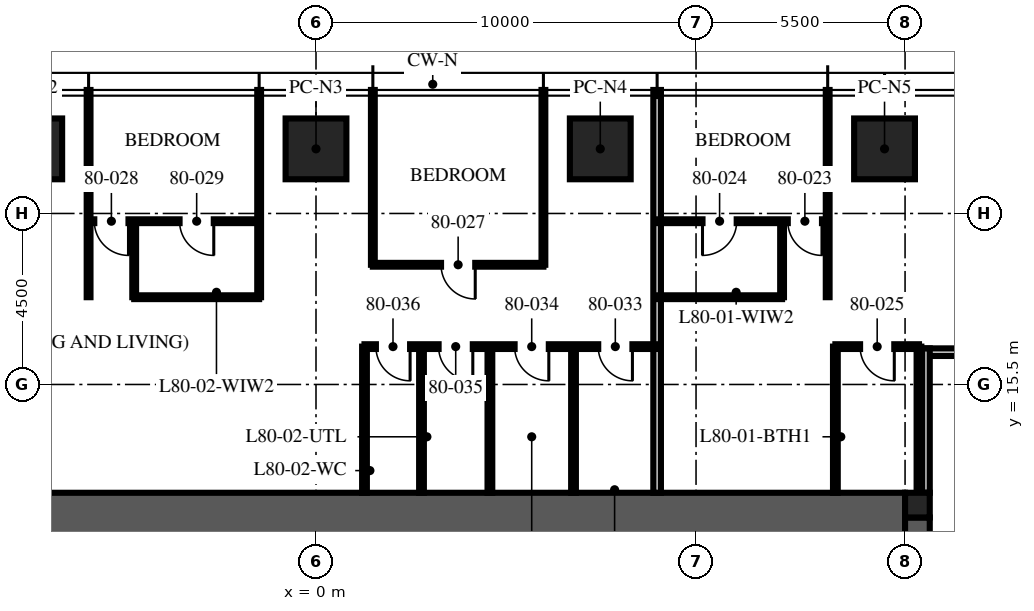
"""IFC4 building model, lengths in metres.
Left out: names, types, materials, properties, quantities, classifications, styles, units other than length and angle.
Written with IfcOpenShell. Run it as: python <this file> out.ifc"""

import sys

from ifc_helpers import new_model, si_unit, direction, frame, frame_2d, origin, origin_2d, place, context, subcontext, project, spatial, rectangle, extrude, element, fill, save


model = new_model("IFC4")
c1 = context("Model", 3, precision=1e-05, world=origin(), true_north=direction((0.0, 1.0)))
c2 = subcontext(c1, "Body", "Model", "MODEL_VIEW")
j1 = project(units=[si_unit("LENGTHUNIT", "METRE"), si_unit("PLANEANGLEUNIT", "RADIAN")], contexts=[c1])
p1 = place(None, origin())
s1 = spatial("IfcSite", under=j1, at=p1, CompositionType="ELEMENT")
p2 = place(p1, origin())
s2 = spatial("IfcBuilding", under=s1, at=p2, CompositionType="ELEMENT")
p3 = place(p2, frame((0.0, 0.0, 319.5)))
s3 = spatial("IfcBuildingStorey", under=s2, at=p3, CompositionType="ELEMENT", Elevation=319.5)
p4 = place(p3, frame((15.5, -12.0, -0.25), z_axis=(0.0, 0.0, 1.0), x_axis=(0.0, 1.0, 0.0)))
e1 = element("IfcWall", 1, at=p4, inside=s3, PredefinedType="SHEAR", context=c2, shape_type="SweptSolid", body=[
    extrude(rectangle(XDim=24.0, YDim=1.3, at=frame_2d((12.0, 0.0))), origin(), (0.0, 0.0, 1.0), 3.75),
])
p5 = place(p4, frame((3.125, 0.0, 0.25)))
e2 = element("IfcOpeningElement", 2, at=p5, cuts=e1, PredefinedType="OPENING", context=c2, shape_type="SweptSolid", body=[
    extrude(rectangle(XDim=1.2, YDim=2.1, at=frame_2d((0.6, 1.05))), frame((0.0, 0.66, 0.0), z_axis=(0.0, -1.0, 0.0), x_axis=(1.0, 0.0, 0.0)), (0.0, 0.0, 1.0), 1.32),
])
p6 = place(p4, frame((19.375, 0.0, 0.25)))
e3 = element("IfcOpeningElement", 3, at=p6, cuts=e1, PredefinedType="OPENING", context=c2, shape_type="SweptSolid", body=[
    extrude(rectangle(XDim=1.8, YDim=2.1, at=frame_2d((0.9, 1.05))), frame((0.0, 0.66, 0.0), z_axis=(0.0, -1.0, 0.0), x_axis=(1.0, 0.0, 0.0)), (0.0, 0.0, 1.0), 1.32),
])
p7 = place(p3, frame((-15.5, 12.0, -0.25), z_axis=(0.0, 0.0, 1.0), x_axis=(1.0, 0.0, 0.0)))
e4 = element("IfcWall", 4, at=p7, inside=s3, PredefinedType="SHEAR", context=c2, shape_type="SweptSolid", body=[
    extrude(rectangle(XDim=31.0, YDim=1.3, at=frame_2d((15.5, 0.0))), origin(), (0.0, 0.0, 1.0), 3.75),
])
p8 = place(p3, frame((15.825, 12.325, -0.25), z_axis=(0.0, 0.0, 1.0), x_axis=(1.0, 0.0, 0.0)))
e5 = element("IfcColumn", 5, at=p8, inside=s3, PredefinedType="COLUMN", context=c2, shape_type="SweptSolid", body=[
    extrude(rectangle(XDim=0.65, YDim=0.65, at=origin_2d()), origin(), (0.0, 0.0, 1.0), 3.75),
])
for number, where, z_axis, x_axis in (
    (6, (-7.48, 21.7, 0.0), (0.0, 0.0, 1.0), (1.0, 0.0, 0.0)),
    (7, (0.0, 21.7, 0.0), (0.0, 0.0, 1.0), (1.0, 0.0, 0.0)),
    (8, (7.48, 21.7, 0.0), (0.0, 0.0, 1.0), (1.0, 0.0, 0.0)),
    (9, (14.96, 21.7, 0.0), (0.0, 0.0, 1.0), (1.0, 0.0, 0.0)),
):
    element("IfcColumn", number, at=place(p3, frame(where, z_axis=z_axis, x_axis=x_axis)), inside=s3, PredefinedType="COLUMN", context=c2, shape_type="SweptSolid", body=[
        extrude(rectangle(XDim=1.6, YDim=1.6, at=origin_2d()), origin(), (0.0, 0.0, 1.0), 3.75),
    ])
p9 = place(p3, frame((19.15, 16.35, 0.0), z_axis=(0.0, 0.0, 1.0), x_axis=(-1.0, 0.0, 0.0)))
e10 = element("IfcWall", 10, at=p9, inside=s3, PredefinedType="PARTITIONING", context=c2, shape_type="SweptSolid", body=[
    extrude(rectangle(XDim=3.2, YDim=0.2, at=frame_2d((1.6, 0.0))), origin(), (0.0, 0.0, 1.0), 2.6),
])
p10 = place(p3, frame((16.05, 16.45, 0.0), z_axis=(0.0, 0.0, 1.0), x_axis=(0.0, -1.0, 0.0)))
e11 = element("IfcWall", 11, at=p10, inside=s3, PredefinedType="PARTITIONING", context=c2, shape_type="SweptSolid", body=[
    extrude(rectangle(XDim=3.8, YDim=0.2, at=frame_2d((1.9, 0.0))), origin(), (0.0, 0.0, 1.0), 2.6),
])
p11 = place(p3, frame((13.464, 17.796, 0.0), z_axis=(0.0, 0.0, 1.0), x_axis=(0.0, 1.0, 0.0)))
e12 = element("IfcWall", 12, at=p11, inside=s3, PredefinedType="PARTITIONING", context=c2, shape_type="SweptSolid", body=[
    extrude(rectangle(XDim=5.454, YDim=0.1, at=frame_2d((2.727, 0.0))), origin(), (0.0, 0.0, 1.0), 3.01),
])
p12 = place(p3, frame((8.976, 12.65, 0.0), z_axis=(0.0, 0.0, 1.0), x_axis=(0.0, 1.0, 0.0)))
e13 = element("IfcWall", 13, at=p12, inside=s3, PredefinedType="PARTITIONING", context=c2, shape_type="SweptSolid", body=[
    extrude(rectangle(XDim=10.6, YDim=0.2, at=frame_2d((5.3, 0.0))), origin(), (0.0, 0.0, 1.0), 3.01),
])
for number, where, z_axis, x_axis in (
    (14, (5.984, 18.65, 0.0), (0.0, 0.0, 1.0), (0.0, 1.0, 0.0)),
    (15, (1.496, 18.65, 0.0), (0.0, 0.0, 1.0), (0.0, 1.0, 0.0)),
):
    element("IfcWall", number, at=place(p3, frame(where, z_axis=z_axis, x_axis=x_axis)), inside=s3, PredefinedType="PARTITIONING", context=c2, shape_type="SweptSolid", body=[
        extrude(rectangle(XDim=4.6, YDim=0.1, at=frame_2d((2.3, 0.0))), origin(), (0.0, 0.0, 1.0), 3.01),
    ])
for number, where, z_axis, x_axis in (
    (16, (-1.496, 17.796, 0.0), (0.0, 0.0, 1.0), (0.0, 1.0, 0.0)),
    (17, (-5.984, 17.796, 0.0), (0.0, 0.0, 1.0), (0.0, 1.0, 0.0)),
):
    element("IfcWall", number, at=place(p3, frame(where, z_axis=z_axis, x_axis=x_axis)), inside=s3, PredefinedType="PARTITIONING", context=c2, shape_type="SweptSolid", body=[
        extrude(rectangle(XDim=5.454, YDim=0.1, at=frame_2d((2.727, 0.0))), origin(), (0.0, 0.0, 1.0), 3.01),
    ])
p13 = place(p3, frame((13.464, 19.796, 0.0), z_axis=(0.0, 0.0, 1.0), x_axis=(-1.0, 0.0, 0.0)))
e18 = element("IfcWall", 18, at=p13, inside=s3, PredefinedType="PARTITIONING", context=c2, shape_type="SweptSolid", body=[
    extrude(rectangle(XDim=4.488, YDim=0.1, at=frame_2d((2.244, 0.0))), origin(), (0.0, 0.0, 1.0), 2.91),
])
p14 = place(p13, frame((0.15, 0.0, 0.0)))
e19 = element("IfcOpeningElement", 19, at=p14, cuts=e18, PredefinedType="OPENING", context=c2, shape_type="SweptSolid", body=[
    extrude(rectangle(XDim=0.9, YDim=2.1, at=frame_2d((0.45, 1.05))), frame((0.0, 0.06, 0.0), z_axis=(0.0, -1.0, 0.0), x_axis=(1.0, 0.0, 0.0)), (0.0, 0.0, 1.0), 0.12),
])
p15 = place(p13, frame((2.394, 0.0, 0.0)))
e20 = element("IfcOpeningElement", 20, at=p15, cuts=e18, PredefinedType="OPENING", context=c2, shape_type="SweptSolid", body=[
    extrude(rectangle(XDim=0.9, YDim=2.1, at=frame_2d((0.45, 1.05))), frame((0.0, 0.06, 0.0), z_axis=(0.0, -1.0, 0.0), x_axis=(1.0, 0.0, 0.0)), (0.0, 0.0, 1.0), 0.12),
])
p16 = place(p3, frame((12.264, 17.796, 0.0), z_axis=(0.0, 0.0, 1.0), x_axis=(0.0, 1.0, 0.0)))
e21 = element("IfcWall", 21, at=p16, inside=s3, PredefinedType="PARTITIONING", context=c2, shape_type="SweptSolid", body=[
    extrude(rectangle(XDim=2.0, YDim=0.1, at=frame_2d((1.0, 0.0))), origin(), (0.0, 0.0, 1.0), 3.5),
])
p17 = place(p3, frame((12.264, 17.796, 0.0), z_axis=(0.0, 0.0, 1.0), x_axis=(-1.0, 0.0, 0.0)))
e22 = element("IfcWall", 22, at=p17, inside=s3, PredefinedType="PARTITIONING", context=c2, shape_type="SweptSolid", body=[
    extrude(rectangle(XDim=3.288, YDim=0.1, at=frame_2d((1.644, 0.0))), origin(), (0.0, 0.0, 1.0), 2.91),
])
p18 = place(p3, frame((15.866, 16.496, 0.0), z_axis=(0.0, 0.0, 1.0), x_axis=(-1.0, 0.0, 0.0)))
e23 = element("IfcWall", 23, at=p18, inside=s3, PredefinedType="PARTITIONING", context=c2, shape_type="SweptSolid", body=[
    extrude(rectangle(XDim=2.2, YDim=0.125, at=frame_2d((1.1, 0.0))), origin(), (0.0, 0.0, 1.0), 2.9),
])
p19 = place(p18, frame((0.65, 0.0, 0.0)))
e24 = element("IfcOpeningElement", 24, at=p19, cuts=e23, PredefinedType="OPENING", context=c2, shape_type="SweptSolid", body=[
    extrude(rectangle(XDim=0.9, YDim=2.1, at=frame_2d((0.45, 1.05))), frame((0.0, 0.073, 0.0), z_axis=(0.0, -1.0, 0.0), x_axis=(1.0, 0.0, 0.0)), (0.0, 0.0, 1.0), 0.145),
])
p20 = place(p3, frame((15.866, 12.65, 0.0), z_axis=(0.0, 0.0, 1.0), x_axis=(0.0, 1.0, 0.0)))
e25 = element("IfcWall", 25, at=p20, inside=s3, PredefinedType="PARTITIONING", context=c2, shape_type="SweptSolid", body=[
    extrude(rectangle(XDim=3.846, YDim=0.125, at=frame_2d((1.923, 0.0))), origin(), (0.0, 0.0, 1.0), 2.6),
])
p21 = place(p3, frame((13.667, 12.65, 0.0), z_axis=(0.0, 0.0, 1.0), x_axis=(0.0, 1.0, 0.0)))
e26 = element("IfcWall", 26, at=p21, inside=s3, PredefinedType="PARTITIONING", context=c2, shape_type="SweptSolid", body=[
    extrude(rectangle(XDim=3.846, YDim=0.125, at=frame_2d((1.923, 0.0))), origin(), (0.0, 0.0, 1.0), 3.5),
])
p22 = place(p3, frame((5.984, 18.65, 0.0), z_axis=(0.0, 0.0, 1.0), x_axis=(-1.0, 0.0, 0.0)))
e27 = element("IfcWall", 27, at=p22, inside=s3, PredefinedType="PARTITIONING", context=c2, shape_type="SweptSolid", body=[
    extrude(rectangle(XDim=4.488, YDim=0.1, at=frame_2d((2.244, 0.0))), origin(), (0.0, 0.0, 1.0), 2.91),
])
p23 = place(p22, frame((1.794, 0.0, 0.0)))
e28 = element("IfcOpeningElement", 28, at=p23, cuts=e27, PredefinedType="OPENING", context=c2, shape_type="SweptSolid", body=[
    extrude(rectangle(XDim=0.9, YDim=2.1, at=frame_2d((0.45, 1.05))), frame((0.0, 0.06, 0.0), z_axis=(0.0, -1.0, 0.0), x_axis=(1.0, 0.0, 0.0)), (0.0, 0.0, 1.0), 0.12),
])
p24 = place(p3, frame((-1.496, 19.796, 0.0), z_axis=(0.0, 0.0, 1.0), x_axis=(-1.0, 0.0, 0.0)))
e29 = element("IfcWall", 29, at=p24, inside=s3, PredefinedType="PARTITIONING", context=c2, shape_type="SweptSolid", body=[
    extrude(rectangle(XDim=4.488, YDim=0.1, at=frame_2d((2.244, 0.0))), origin(), (0.0, 0.0, 1.0), 2.91),
])
p25 = place(p24, frame((3.438, 0.0, 0.0)))
e30 = element("IfcOpeningElement", 30, at=p25, cuts=e29, PredefinedType="OPENING", context=c2, shape_type="SweptSolid", body=[
    extrude(rectangle(XDim=0.9, YDim=2.1, at=frame_2d((0.45, 1.05))), frame((0.0, 0.06, 0.0), z_axis=(0.0, -1.0, 0.0), x_axis=(1.0, 0.0, 0.0)), (0.0, 0.0, 1.0), 0.12),
])
p26 = place(p24, frame((1.194, 0.0, 0.0)))
e31 = element("IfcOpeningElement", 31, at=p26, cuts=e29, PredefinedType="OPENING", context=c2, shape_type="SweptSolid", body=[
    extrude(rectangle(XDim=0.9, YDim=2.1, at=frame_2d((0.45, 1.05))), frame((0.0, 0.06, 0.0), z_axis=(0.0, -1.0, 0.0), x_axis=(1.0, 0.0, 0.0)), (0.0, 0.0, 1.0), 0.12),
])
p27 = place(p3, frame((-4.784, 17.796, 0.0), z_axis=(0.0, 0.0, 1.0), x_axis=(0.0, 1.0, 0.0)))
e32 = element("IfcWall", 32, at=p27, inside=s3, PredefinedType="PARTITIONING", context=c2, shape_type="SweptSolid", body=[
    extrude(rectangle(XDim=2.0, YDim=0.1, at=frame_2d((1.0, 0.0))), origin(), (0.0, 0.0, 1.0), 3.5),
])
p28 = place(p3, frame((-1.496, 17.796, 0.0), z_axis=(0.0, 0.0, 1.0), x_axis=(-1.0, 0.0, 0.0)))
e33 = element("IfcWall", 33, at=p28, inside=s3, PredefinedType="PARTITIONING", context=c2, shape_type="SweptSolid", body=[
    extrude(rectangle(XDim=3.288, YDim=0.1, at=frame_2d((1.644, 0.0))), origin(), (0.0, 0.0, 1.0), 2.91),
])
p29 = place(p3, frame((8.976, 16.496, 0.0), z_axis=(0.0, 0.0, 1.0), x_axis=(-1.0, 0.0, 0.0)))
e34 = element("IfcWall", 34, at=p29, inside=s3, PredefinedType="PARTITIONING", context=c2, shape_type="SweptSolid", body=[
    extrude(rectangle(XDim=7.7, YDim=0.125, at=frame_2d((3.85, 0.0))), origin(), (0.0, 0.0, 1.0), 2.9),
])
p30 = place(p29, frame((0.65, 0.0, 0.0)))
e35 = element("IfcOpeningElement", 35, at=p30, cuts=e34, PredefinedType="OPENING", context=c2, shape_type="SweptSolid", body=[
    extrude(rectangle(XDim=0.9, YDim=2.1, at=frame_2d((0.45, 1.05))), frame((0.0, 0.073, 0.0), z_axis=(0.0, -1.0, 0.0), x_axis=(1.0, 0.0, 0.0)), (0.0, 0.0, 1.0), 0.145),
])
p31 = place(p29, frame((2.85, 0.0, 0.0)))
e36 = element("IfcOpeningElement", 36, at=p31, cuts=e34, PredefinedType="OPENING", context=c2, shape_type="SweptSolid", body=[
    extrude(rectangle(XDim=0.9, YDim=2.1, at=frame_2d((0.45, 1.05))), frame((0.0, 0.073, 0.0), z_axis=(0.0, -1.0, 0.0), x_axis=(1.0, 0.0, 0.0)), (0.0, 0.0, 1.0), 0.145),
])
p32 = place(p29, frame((4.85, 0.0, 0.0)))
e37 = element("IfcOpeningElement", 37, at=p32, cuts=e34, PredefinedType="OPENING", context=c2, shape_type="SweptSolid", body=[
    extrude(rectangle(XDim=0.9, YDim=2.1, at=frame_2d((0.45, 1.05))), frame((0.0, 0.073, 0.0), z_axis=(0.0, -1.0, 0.0), x_axis=(1.0, 0.0, 0.0)), (0.0, 0.0, 1.0), 0.145),
])
p33 = place(p29, frame((6.5, 0.0, 0.0)))
e38 = element("IfcOpeningElement", 38, at=p33, cuts=e34, PredefinedType="OPENING", context=c2, shape_type="SweptSolid", body=[
    extrude(rectangle(XDim=0.9, YDim=2.1, at=frame_2d((0.45, 1.05))), frame((0.0, 0.073, 0.0), z_axis=(0.0, -1.0, 0.0), x_axis=(1.0, 0.0, 0.0)), (0.0, 0.0, 1.0), 0.145),
])
for number, where, z_axis, x_axis in (
    (39, (6.776, 12.65, 0.0), (0.0, 0.0, 1.0), (0.0, 1.0, 0.0)),
    (40, (4.576, 12.65, 0.0), (0.0, 0.0, 1.0), (0.0, 1.0, 0.0)),
    (41, (2.776, 12.65, 0.0), (0.0, 0.0, 1.0), (0.0, 1.0, 0.0)),
    (42, (1.276, 12.65, 0.0), (0.0, 0.0, 1.0), (0.0, 1.0, 0.0)),
):
    element("IfcWall", number, at=place(p3, frame(where, z_axis=z_axis, x_axis=x_axis)), inside=s3, PredefinedType="PARTITIONING", context=c2, shape_type="SweptSolid", body=[
        extrude(rectangle(XDim=3.846, YDim=0.125, at=frame_2d((1.923, 0.0))), origin(), (0.0, 0.0, 1.0), 3.5),
    ])
p34 = place(p14, origin())
e43 = element("IfcDoor", 43, at=p34, inside=s3, OperationType="SINGLE_SWING_LEFT", PredefinedType="DOOR", context=c2, shape_type="SweptSolid", body=[
    extrude(rectangle(XDim=0.9, YDim=2.1, at=frame_2d((0.45, 1.05))), frame((0.0, 0.025, 0.0), z_axis=(0.0, -1.0, 0.0), x_axis=(1.0, 0.0, 0.0)), (0.0, 0.0, 1.0), 0.05),
])
fill(e19, e43)
p35 = place(p15, origin())
e44 = element("IfcDoor", 44, at=p35, inside=s3, OperationType="SINGLE_SWING_RIGHT", PredefinedType="DOOR", context=c2, shape_type="SweptSolid", body=[
    extrude(rectangle(XDim=0.9, YDim=2.1, at=frame_2d((0.45, 1.05))), frame((0.0, 0.025, 0.0), z_axis=(0.0, -1.0, 0.0), x_axis=(1.0, 0.0, 0.0)), (0.0, 0.0, 1.0), 0.05),
])
fill(e20, e44)
p36 = place(p19, origin())
e45 = element("IfcDoor", 45, at=p36, inside=s3, OperationType="SINGLE_SWING_LEFT", PredefinedType="DOOR", context=c2, shape_type="SweptSolid", body=[
    extrude(rectangle(XDim=0.9, YDim=2.1, at=frame_2d((0.45, 1.05))), frame((0.0, 0.025, 0.0), z_axis=(0.0, -1.0, 0.0), x_axis=(1.0, 0.0, 0.0)), (0.0, 0.0, 1.0), 0.05),
])
fill(e24, e45)
p37 = place(p23, origin())
e46 = element("IfcDoor", 46, at=p37, inside=s3, OperationType="SINGLE_SWING_LEFT", PredefinedType="DOOR", context=c2, shape_type="SweptSolid", body=[
    extrude(rectangle(XDim=0.9, YDim=2.1, at=frame_2d((0.45, 1.05))), frame((0.0, 0.025, 0.0), z_axis=(0.0, -1.0, 0.0), x_axis=(1.0, 0.0, 0.0)), (0.0, 0.0, 1.0), 0.05),
])
fill(e28, e46)
p38 = place(p25, origin())
e47 = element("IfcDoor", 47, at=p38, inside=s3, OperationType="SINGLE_SWING_LEFT", PredefinedType="DOOR", context=c2, shape_type="SweptSolid", body=[
    extrude(rectangle(XDim=0.9, YDim=2.1, at=frame_2d((0.45, 1.05))), frame((0.0, 0.025, 0.0), z_axis=(0.0, -1.0, 0.0), x_axis=(1.0, 0.0, 0.0)), (0.0, 0.0, 1.0), 0.05),
])
fill(e30, e47)
p39 = place(p26, origin())
e48 = element("IfcDoor", 48, at=p39, inside=s3, OperationType="SINGLE_SWING_LEFT", PredefinedType="DOOR", context=c2, shape_type="SweptSolid", body=[
    extrude(rectangle(XDim=0.9, YDim=2.1, at=frame_2d((0.45, 1.05))), frame((0.0, 0.025, 0.0), z_axis=(0.0, -1.0, 0.0), x_axis=(1.0, 0.0, 0.0)), (0.0, 0.0, 1.0), 0.05),
])
fill(e31, e48)
p40 = place(p30, origin())
e49 = element("IfcDoor", 49, at=p40, inside=s3, OperationType="SINGLE_SWING_LEFT", PredefinedType="DOOR", context=c2, shape_type="SweptSolid", body=[
    extrude(rectangle(XDim=0.9, YDim=2.1, at=frame_2d((0.45, 1.05))), frame((0.0, 0.025, 0.0), z_axis=(0.0, -1.0, 0.0), x_axis=(1.0, 0.0, 0.0)), (0.0, 0.0, 1.0), 0.05),
])
fill(e35, e49)
p41 = place(p31, origin())
e50 = element("IfcDoor", 50, at=p41, inside=s3, OperationType="SINGLE_SWING_LEFT", PredefinedType="DOOR", context=c2, shape_type="SweptSolid", body=[
    extrude(rectangle(XDim=0.9, YDim=2.1, at=frame_2d((0.45, 1.05))), frame((0.0, 0.025, 0.0), z_axis=(0.0, -1.0, 0.0), x_axis=(1.0, 0.0, 0.0)), (0.0, 0.0, 1.0), 0.05),
])
fill(e36, e50)
p42 = place(p32, origin())
e51 = element("IfcDoor", 51, at=p42, inside=s3, OperationType="SINGLE_SWING_LEFT", PredefinedType="DOOR", context=c2, shape_type="SweptSolid", body=[
    extrude(rectangle(XDim=0.9, YDim=2.1, at=frame_2d((0.45, 1.05))), frame((0.0, 0.025, 0.0), z_axis=(0.0, -1.0, 0.0), x_axis=(1.0, 0.0, 0.0)), (0.0, 0.0, 1.0), 0.05),
])
fill(e37, e51)
p43 = place(p33, origin())
e52 = element("IfcDoor", 52, at=p43, inside=s3, OperationType="SINGLE_SWING_LEFT", PredefinedType="DOOR", context=c2, shape_type="SweptSolid", body=[
    extrude(rectangle(XDim=0.9, YDim=2.1, at=frame_2d((0.45, 1.05))), frame((0.0, 0.025, 0.0), z_axis=(0.0, -1.0, 0.0), x_axis=(1.0, 0.0, 0.0)), (0.0, 0.0, 1.0), 0.05),
])
fill(e38, e52)
save(model, sys.argv[1])
